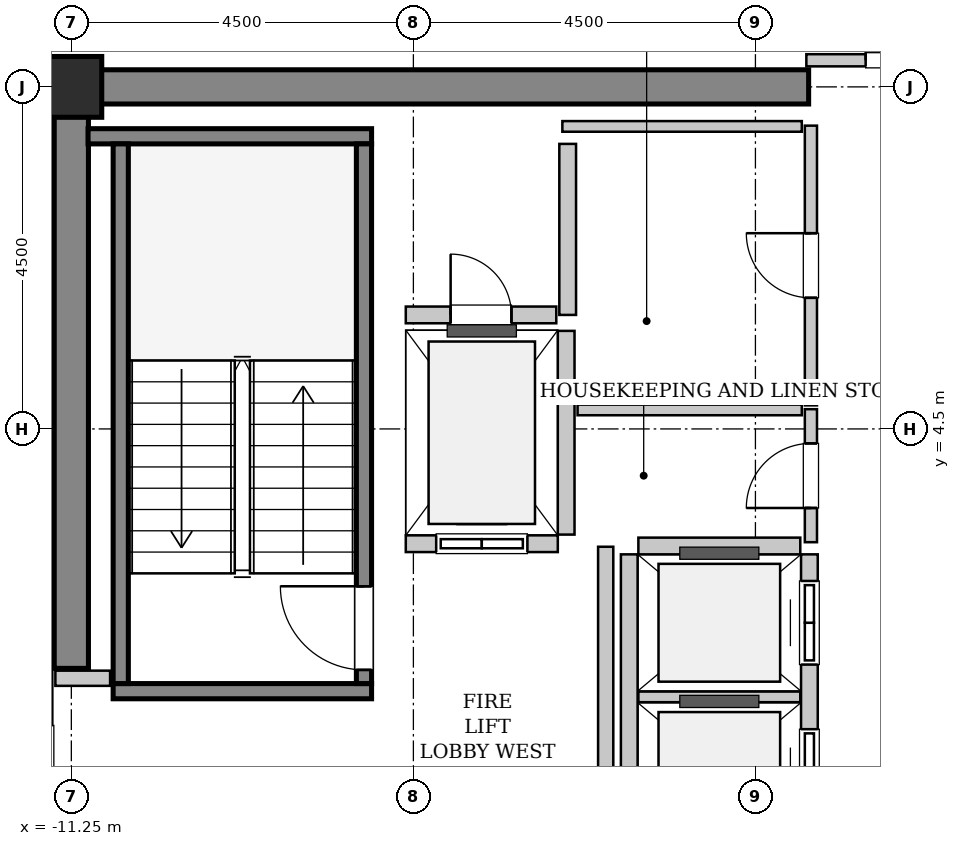
"""IFC4 building model, lengths in metres.
Left out: names, types, materials, properties, quantities, classifications, styles, units other than length and angle.
Written with IfcOpenShell. Run it as: python <this file> out.ifc"""

import sys

from ifc_helpers import new_model, si_unit, direction, frame, frame_2d, origin, origin_2d, place, context, subcontext, project, spatial, rectangle, hollow_rectangle, extrude, source, transform, mapped, element, fill, save


model = new_model("IFC4")
c1 = context("Model", 3, precision=1e-05, world=origin(), true_north=direction((0.0, 1.0)))
c2 = subcontext(c1, "Body", "Model", "MODEL_VIEW")
j1 = project(units=[si_unit("LENGTHUNIT", "METRE"), si_unit("PLANEANGLEUNIT", "RADIAN")], contexts=[c1])
p1 = place(None, origin())
s1 = spatial("IfcSite", under=j1, at=p1, CompositionType="ELEMENT")
p2 = place(p1, origin())
s2 = spatial("IfcBuilding", under=s1, at=p2, CompositionType="ELEMENT")
p3 = place(p2, frame((0.0, 0.0, 264.6)))
s3 = spatial("IfcBuildingStorey", under=s2, at=p3, CompositionType="ELEMENT", Elevation=264.6)
m1 = source(origin(), c2, "Body", "SweptSolid", [
    extrude(rectangle(XDim=9.925, YDim=0.45, at=frame_2d((4.962, 0.0))), origin(), (0.0, 0.0, 1.0), 3.8),
])
p4 = place(p3, frame((-11.475, 9.0, 0.0), z_axis=(0.0, 0.0, 1.0), x_axis=(1.0, 0.0, 0.0)))
e1 = element("IfcWall", 1, at=p4, inside=s3, PredefinedType="SHEAR", context=c2, shape_type="MappedRepresentation", body=[
    mapped(m1, transform((0.0, 0.0, 0.0), x_axis=(1.0, 0.0, 0.0), y_axis=(0.0, 1.0, 0.0), z_axis=(0.0, 0.0, 1.0), scale=1.0)),
])
m2 = source(origin(), c2, "Body", "SweptSolid", [
    extrude(rectangle(XDim=7.425, YDim=0.45, at=frame_2d((3.712, 0.0))), origin(), (0.0, 0.0, 1.0), 3.8),
])
p5 = place(p3, frame((-11.25, 1.35, 0.0), z_axis=(0.0, 0.0, 1.0), x_axis=(0.0, 1.0, 0.0)))
e2 = element("IfcWall", 2, at=p5, inside=s3, PredefinedType="SHEAR", context=c2, shape_type="MappedRepresentation", body=[
    mapped(m2, transform((0.0, 0.0, 0.0), x_axis=(1.0, 0.0, 0.0), y_axis=(0.0, 1.0, 0.0), z_axis=(0.0, 0.0, 1.0), scale=1.0)),
])
m3 = source(origin(), c2, "Body", "SweptSolid", [
    extrude(hollow_rectangle(XDim=0.8, YDim=0.8, WallThickness=0.04, InnerFilletRadius=0.04, OuterFilletRadius=0.08, at=origin_2d()), origin(), (0.0, 0.0, 1.0), 3.8),
])
p6 = place(p3, frame((-11.25, 9.0, 0.0), z_axis=(0.0, 0.0, 1.0), x_axis=(1.0, 0.0, 0.0)))
e3 = element("IfcColumn", 3, at=p6, inside=s3, PredefinedType="COLUMN", context=c2, shape_type="MappedRepresentation", body=[
    mapped(m3, transform((0.0, 0.0, 0.0), x_axis=(1.0, 0.0, 0.0), y_axis=(0.0, 1.0, 0.0), z_axis=(0.0, 0.0, 1.0), scale=1.0)),
])
m4 = source(origin(), c2, "Body", "SweptSolid", [
    extrude(rectangle(XDim=3.4, YDim=0.2, at=frame_2d((1.7, 0.0))), origin(), (0.0, 0.0, 1.0), 3.8),
])
p7 = place(p3, frame((-7.3, 1.05, 0.0), z_axis=(0.0, 0.0, 1.0), x_axis=(-1.0, 0.0, 0.0)))
e4 = element("IfcWall", 4, at=p7, inside=s3, PredefinedType="SOLIDWALL", context=c2, shape_type="MappedRepresentation", body=[
    mapped(m4, transform((0.0, 0.0, 0.0), x_axis=(1.0, 0.0, 0.0), y_axis=(0.0, 1.0, 0.0), z_axis=(0.0, 0.0, 1.0), scale=1.0)),
])
m5 = source(origin(), c2, "Body", "SweptSolid", [
    extrude(rectangle(XDim=3.73, YDim=0.2, at=frame_2d((1.865, 0.0))), origin(), (0.0, 0.0, 1.0), 3.8),
])
p8 = place(p3, frame((-7.3, 8.35, 0.0), z_axis=(0.0, 0.0, 1.0), x_axis=(-1.0, 0.0, 0.0)))
e5 = element("IfcWall", 5, at=p8, inside=s3, PredefinedType="SOLIDWALL", context=c2, shape_type="MappedRepresentation", body=[
    mapped(m5, transform((0.0, 0.0, 0.0), x_axis=(1.0, 0.0, 0.0), y_axis=(0.0, 1.0, 0.0), z_axis=(0.0, 0.0, 1.0), scale=1.0)),
])
m6 = source(origin(), c2, "Body", "SweptSolid", [
    extrude(rectangle(XDim=7.1, YDim=0.2, at=frame_2d((3.55, 0.0))), origin(), (0.0, 0.0, 1.0), 3.8),
])
p9 = place(p3, frame((-7.4, 1.15, 0.0), z_axis=(0.0, 0.0, 1.0), x_axis=(0.0, 1.0, 0.0)))
e6 = element("IfcWall", 6, at=p9, inside=s3, PredefinedType="SOLIDWALL", context=c2, shape_type="MappedRepresentation", body=[
    mapped(m6, transform((0.0, 0.0, 0.0), x_axis=(1.0, 0.0, 0.0), y_axis=(0.0, 1.0, 0.0), z_axis=(0.0, 0.0, 1.0), scale=1.0)),
])
p10 = place(p9, frame((0.18, 0.0, 0.0)))
e7 = element("IfcOpeningElement", 7, at=p10, cuts=e6, PredefinedType="OPENING", context=c2, shape_type="SweptSolid", body=[
    extrude(rectangle(XDim=1.1, YDim=2.15, at=frame_2d((0.55, 1.075))), frame((0.0, 0.11, 0.0), z_axis=(0.0, -1.0, 0.0), x_axis=(1.0, 0.0, 0.0)), (0.0, 0.0, 1.0), 0.22),
])
p11 = place(p3, frame((-10.6, 1.15, 0.0), z_axis=(0.0, 0.0, 1.0), x_axis=(0.0, 1.0, 0.0)))
e8 = element("IfcWall", 8, at=p11, inside=s3, PredefinedType="SOLIDWALL", context=c2, shape_type="MappedRepresentation", body=[
    mapped(m6, transform((0.0, 0.0, 0.0), x_axis=(1.0, 0.0, 0.0), y_axis=(0.0, 1.0, 0.0), z_axis=(0.0, 0.0, 1.0), scale=1.0)),
])
m7 = source(origin(), c2, "Body", "SweptSolid", [
    extrude(rectangle(XDim=2.0, YDim=0.22, at=frame_2d((1.0, 0.0))), origin(), (0.0, 0.0, 1.0), 3.535),
])
p12 = place(p3, frame((-6.85, 2.99, 0.0), z_axis=(0.0, 0.0, 1.0), x_axis=(1.0, 0.0, 0.0)))
e9 = element("IfcWall", 9, at=p12, inside=s3, PredefinedType="SOLIDWALL", context=c2, shape_type="MappedRepresentation", body=[
    mapped(m7, transform((0.0, 0.0, 0.0), x_axis=(1.0, 0.0, 0.0), y_axis=(0.0, 1.0, 0.0), z_axis=(0.0, 0.0, 1.0), scale=1.0)),
])
p13 = place(p12, frame((0.4, 0.0, 0.0)))
e10 = element("IfcOpeningElement", 10, at=p13, cuts=e9, PredefinedType="OPENING", context=c2, shape_type="SweptSolid", body=[
    extrude(rectangle(XDim=1.2, YDim=2.2, at=frame_2d((0.6, 1.1))), frame((0.0, 0.12, 0.0), z_axis=(0.0, -1.0, 0.0), x_axis=(1.0, 0.0, 0.0)), (0.0, 0.0, 1.0), 0.24),
])
m8 = source(origin(), c2, "Body", "SweptSolid", [
    extrude(rectangle(XDim=2.68, YDim=0.22, at=frame_2d((1.34, 0.0))), origin(), (0.0, 0.0, 1.0), 3.535),
])
p14 = place(p3, frame((-4.74, 3.11, 0.0), z_axis=(0.0, 0.0, 1.0), x_axis=(0.0, 1.0, 0.0)))
e11 = element("IfcWall", 11, at=p14, inside=s3, PredefinedType="SOLIDWALL", context=c2, shape_type="MappedRepresentation", body=[
    mapped(m8, transform((0.0, 0.0, 0.0), x_axis=(1.0, 0.0, 0.0), y_axis=(0.0, 1.0, 0.0), z_axis=(0.0, 0.0, 1.0), scale=1.0)),
])
m9 = source(origin(), c2, "Body", "SweptSolid", [
    extrude(rectangle(XDim=5.7, YDim=0.22, at=frame_2d((2.85, 0.0))), origin(), (0.0, 0.0, 1.0), 3.535),
])
p15 = place(p3, frame((-1.54, -2.85, 0.0), z_axis=(0.0, 0.0, 1.0), x_axis=(0.0, 1.0, 0.0)))
e12 = element("IfcWall", 12, at=p15, inside=s3, PredefinedType="SOLIDWALL", context=c2, shape_type="MappedRepresentation", body=[
    mapped(m9, transform((0.0, 0.0, 0.0), x_axis=(1.0, 0.0, 0.0), y_axis=(0.0, 1.0, 0.0), z_axis=(0.0, 0.0, 1.0), scale=1.0)),
])
p16 = place(p15, frame((0.35, 0.0, 0.0)))
e13 = element("IfcOpeningElement", 13, at=p16, cuts=e12, PredefinedType="OPENING", context=c2, shape_type="SweptSolid", body=[
    extrude(rectangle(XDim=1.1, YDim=2.2, at=frame_2d((0.55, 1.1))), frame((0.0, 0.12, 0.0), z_axis=(0.0, -1.0, 0.0), x_axis=(1.0, 0.0, 0.0)), (0.0, 0.0, 1.0), 0.24),
])
p17 = place(p15, frame((2.3, 0.0, 0.0)))
e14 = element("IfcOpeningElement", 14, at=p17, cuts=e12, PredefinedType="OPENING", context=c2, shape_type="SweptSolid", body=[
    extrude(rectangle(XDim=1.1, YDim=2.2, at=frame_2d((0.55, 1.1))), frame((0.0, 0.12, 0.0), z_axis=(0.0, -1.0, 0.0), x_axis=(1.0, 0.0, 0.0)), (0.0, 0.0, 1.0), 0.24),
])
p18 = place(p15, frame((4.25, 0.0, 0.0)))
e15 = element("IfcOpeningElement", 15, at=p18, cuts=e12, PredefinedType="OPENING", context=c2, shape_type="SweptSolid", body=[
    extrude(rectangle(XDim=1.1, YDim=2.2, at=frame_2d((0.55, 1.1))), frame((0.0, 0.12, 0.0), z_axis=(0.0, -1.0, 0.0), x_axis=(1.0, 0.0, 0.0)), (0.0, 0.0, 1.0), 0.24),
])
p19 = place(p3, frame((-3.91, 2.85, 0.0), z_axis=(0.0, 0.0, 1.0), x_axis=(0.0, -1.0, 0.0)))
e16 = element("IfcWall", 16, at=p19, inside=s3, PredefinedType="SOLIDWALL", context=c2, shape_type="MappedRepresentation", body=[
    mapped(m9, transform((0.0, 0.0, 0.0), x_axis=(1.0, 0.0, 0.0), y_axis=(0.0, 1.0, 0.0), z_axis=(0.0, 0.0, 1.0), scale=1.0)),
])
m10 = source(origin(), c2, "Body", "SweptSolid", [
    extrude(rectangle(XDim=2.13, YDim=0.14, at=frame_2d((1.065, 0.0))), origin(), (0.0, 0.0, 1.0), 3.535),
])
p20 = place(p3, frame((-3.79, 0.975, 0.0), z_axis=(0.0, 0.0, 1.0), x_axis=(1.0, 0.0, 0.0)))
e17 = element("IfcWall", 17, at=p20, inside=s3, PredefinedType="PARTITIONING", context=c2, shape_type="MappedRepresentation", body=[
    mapped(m10, transform((0.0, 0.0, 0.0), x_axis=(1.0, 0.0, 0.0), y_axis=(0.0, 1.0, 0.0), z_axis=(0.0, 0.0, 1.0), scale=1.0)),
])
m11 = source(origin(), c2, "Body", "SweptSolid", [
    extrude(rectangle(XDim=2.13, YDim=0.22, at=frame_2d((1.065, 0.0))), origin(), (0.0, 0.0, 1.0), 3.535),
])
p21 = place(p3, frame((-1.66, 2.96, 0.0), z_axis=(0.0, 0.0, 1.0), x_axis=(-1.0, 0.0, 0.0)))
e18 = element("IfcWall", 18, at=p21, inside=s3, PredefinedType="SOLIDWALL", context=c2, shape_type="MappedRepresentation", body=[
    mapped(m11, transform((0.0, 0.0, 0.0), x_axis=(1.0, 0.0, 0.0), y_axis=(0.0, 1.0, 0.0), z_axis=(0.0, 0.0, 1.0), scale=1.0)),
])
m12 = source(origin(), c2, "Body", "SweptSolid", [
    extrude(rectangle(XDim=2.25, YDim=0.22, at=frame_2d((1.125, 0.0))), origin(), (0.0, 0.0, 1.0), 3.535),
])
p22 = place(p3, frame((-4.72, 6.0, 0.0), z_axis=(0.0, 0.0, 1.0), x_axis=(0.0, 1.0, 0.0)))
e19 = element("IfcWall", 19, at=p22, inside=s3, PredefinedType="SOLIDWALL", context=c2, shape_type="MappedRepresentation", body=[
    mapped(m12, transform((0.0, 0.0, 0.0), x_axis=(1.0, 0.0, 0.0), y_axis=(0.0, 1.0, 0.0), z_axis=(0.0, 0.0, 1.0), scale=1.0)),
])
m13 = source(origin(), c2, "Body", "SweptSolid", [
    extrude(rectangle(XDim=1.98, YDim=0.22, at=frame_2d((0.99, 0.0))), origin(), (0.0, 0.0, 1.0), 3.535),
])
p23 = place(p3, frame((-6.85, 6.0, 0.0), z_axis=(0.0, 0.0, 1.0), x_axis=(1.0, 0.0, 0.0)))
e20 = element("IfcWall", 20, at=p23, inside=s3, PredefinedType="SOLIDWALL", context=c2, shape_type="MappedRepresentation", body=[
    mapped(m13, transform((0.0, 0.0, 0.0), x_axis=(1.0, 0.0, 0.0), y_axis=(0.0, 1.0, 0.0), z_axis=(0.0, 0.0, 1.0), scale=1.0)),
])
p24 = place(p23, frame((0.59, 0.0, 0.0)))
e21 = element("IfcOpeningElement", 21, at=p24, cuts=e20, PredefinedType="OPENING", context=c2, shape_type="SweptSolid", body=[
    extrude(rectangle(XDim=0.8, YDim=2.0, at=frame_2d((0.4, 1.0))), frame((0.0, 0.12, 0.0), z_axis=(0.0, -1.0, 0.0), x_axis=(1.0, 0.0, 0.0)), (0.0, 0.0, 1.0), 0.24),
])
m14 = source(origin(), c2, "Body", "SweptSolid", [
    extrude(rectangle(XDim=5.9, YDim=0.2, at=frame_2d((2.95, 0.0))), origin(), (0.0, 0.0, 1.0), 3.535),
])
p25 = place(p3, frame((-4.22, -2.95, 0.0), z_axis=(0.0, 0.0, 1.0), x_axis=(0.0, 1.0, 0.0)))
e22 = element("IfcWall", 22, at=p25, inside=s3, PredefinedType="PARTITIONING", context=c2, shape_type="MappedRepresentation", body=[
    mapped(m14, transform((0.0, 0.0, 0.0), x_axis=(1.0, 0.0, 0.0), y_axis=(0.0, 1.0, 0.0), z_axis=(0.0, 0.0, 1.0), scale=1.0)),
])
m15 = source(origin(), c2, "Body", "SweptSolid", [
    extrude(rectangle(XDim=0.72, YDim=0.2, at=frame_2d((0.36, 0.0))), origin(), (0.0, 0.0, 1.0), 3.535),
])
p26 = place(p3, frame((-11.46, 1.22, 0.0), z_axis=(0.0, 0.0, 1.0), x_axis=(1.0, 0.0, 0.0)))
e23 = element("IfcWall", 23, at=p26, inside=s3, PredefinedType="PARTITIONING", context=c2, shape_type="MappedRepresentation", body=[
    mapped(m15, transform((0.0, 0.0, 0.0), x_axis=(1.0, 0.0, 0.0), y_axis=(0.0, 1.0, 0.0), z_axis=(0.0, 0.0, 1.0), scale=1.0)),
])
m16 = source(origin(), c2, "Body", "SweptSolid", [
    extrude(rectangle(XDim=3.16, YDim=0.16, at=frame_2d((1.58, 0.0))), origin(), (0.0, 0.0, 1.0), 2.625),
])
p27 = place(p3, frame((-1.58, 9.35, 0.0), z_axis=(0.0, 0.0, 1.0), x_axis=(1.0, 0.0, 0.0)))
e24 = element("IfcWall", 24, at=p27, inside=s3, PredefinedType="PARTITIONING", context=c2, shape_type="MappedRepresentation", body=[
    mapped(m16, transform((0.0, 0.0, 0.0), x_axis=(1.0, 0.0, 0.0), y_axis=(0.0, 1.0, 0.0), z_axis=(0.0, 0.0, 1.0), scale=1.0)),
])
p28 = place(p27, frame((0.78, 0.0, 0.0)))
e25 = element("IfcOpeningElement", 25, at=p28, cuts=e24, PredefinedType="OPENING", context=c2, shape_type="SweptSolid", body=[
    extrude(rectangle(XDim=1.6, YDim=2.3, at=frame_2d((0.8, 1.15))), frame((0.0, 0.09, 0.0), z_axis=(0.0, -1.0, 0.0), x_axis=(1.0, 0.0, 0.0)), (0.0, 0.0, 1.0), 0.18),
])
m17 = source(origin(), c2, "Body", "SweptSolid", [
    extrude(rectangle(XDim=1.75, YDim=0.16, at=frame_2d((0.875, 0.0))), origin(), (0.0, 0.0, 1.0), 3.535),
])
p29 = place(p3, frame((-1.52, 3.01, 0.0), z_axis=(0.0, 0.0, 1.0), x_axis=(0.0, 1.0, 0.0)))
e26 = element("IfcWall", 26, at=p29, inside=s3, PredefinedType="PARTITIONING", context=c2, shape_type="MappedRepresentation", body=[
    mapped(m17, transform((0.0, 0.0, 0.0), x_axis=(1.0, 0.0, 0.0), y_axis=(0.0, 1.0, 0.0), z_axis=(0.0, 0.0, 1.0), scale=1.0)),
])
p30 = place(p29, frame((0.45, 0.0, 0.0)))
e27 = element("IfcOpeningElement", 27, at=p30, cuts=e26, PredefinedType="OPENING", context=c2, shape_type="SweptSolid", body=[
    extrude(rectangle(XDim=0.85, YDim=2.1, at=frame_2d((0.425, 1.05))), frame((0.0, 0.09, 0.0), z_axis=(0.0, -1.0, 0.0), x_axis=(1.0, 0.0, 0.0)), (0.0, 0.0, 1.0), 0.18),
])
m18 = source(origin(), c2, "Body", "SweptSolid", [
    extrude(rectangle(XDim=2.95, YDim=0.14, at=frame_2d((1.475, 0.0))), origin(), (0.0, 0.0, 1.0), 3.535),
])
p31 = place(p3, frame((-4.59, 4.75, 0.0), z_axis=(0.0, 0.0, 1.0), x_axis=(1.0, 0.0, 0.0)))
e28 = element("IfcWall", 28, at=p31, inside=s3, PredefinedType="PARTITIONING", context=c2, shape_type="MappedRepresentation", body=[
    mapped(m18, transform((0.0, 0.0, 0.0), x_axis=(1.0, 0.0, 0.0), y_axis=(0.0, 1.0, 0.0), z_axis=(0.0, 0.0, 1.0), scale=1.0)),
])
m19 = source(origin(), c2, "Body", "SweptSolid", [
    extrude(rectangle(XDim=3.68, YDim=0.16, at=frame_2d((1.84, 0.0))), origin(), (0.0, 0.0, 1.0), 3.535),
])
p32 = place(p3, frame((-1.52, 4.81, 0.0), z_axis=(0.0, 0.0, 1.0), x_axis=(0.0, 1.0, 0.0)))
e29 = element("IfcWall", 29, at=p32, inside=s3, PredefinedType="PARTITIONING", context=c2, shape_type="MappedRepresentation", body=[
    mapped(m19, transform((0.0, 0.0, 0.0), x_axis=(1.0, 0.0, 0.0), y_axis=(0.0, 1.0, 0.0), z_axis=(0.0, 0.0, 1.0), scale=1.0)),
])
p33 = place(p32, frame((1.415, 0.0, 0.0)))
e30 = element("IfcOpeningElement", 30, at=p33, cuts=e29, PredefinedType="OPENING", context=c2, shape_type="SweptSolid", body=[
    extrude(rectangle(XDim=0.85, YDim=2.1, at=frame_2d((0.425, 1.05))), frame((0.0, 0.09, 0.0), z_axis=(0.0, -1.0, 0.0), x_axis=(1.0, 0.0, 0.0)), (0.0, 0.0, 1.0), 0.18),
])
m20 = source(origin(), c2, "Body", "SweptSolid", [
    extrude(rectangle(XDim=3.15, YDim=0.14, at=frame_2d((1.575, 0.0))), origin(), (0.0, 0.0, 1.0), 3.535),
])
p34 = place(p3, frame((-4.79, 8.48, 0.0), z_axis=(0.0, 0.0, 1.0), x_axis=(1.0, 0.0, 0.0)))
e31 = element("IfcWall", 31, at=p34, inside=s3, PredefinedType="PARTITIONING", context=c2, shape_type="MappedRepresentation", body=[
    mapped(m20, transform((0.0, 0.0, 0.0), x_axis=(1.0, 0.0, 0.0), y_axis=(0.0, 1.0, 0.0), z_axis=(0.0, 0.0, 1.0), scale=1.0)),
])
m21 = source(origin(), c2, "Body", "SweptSolid", [
    extrude(rectangle(XDim=1.1, YDim=2.15, at=frame_2d((0.55, 1.075))), frame((0.0, 0.025, 0.0), z_axis=(0.0, -1.0, 0.0), x_axis=(1.0, 0.0, 0.0)), (0.0, 0.0, 1.0), 0.05),
])
p35 = place(p10, origin())
e32 = element("IfcDoor", 32, at=p35, inside=s3, OperationType="SINGLE_SWING_RIGHT", PredefinedType="DOOR", context=c2, shape_type="MappedRepresentation", body=[
    mapped(m21, transform((0.0, 0.0, 0.0), x_axis=(1.0, 0.0, 0.0), y_axis=(0.0, 1.0, 0.0), z_axis=(0.0, 0.0, 1.0), scale=1.0)),
])
fill(e7, e32)
m22 = source(origin(), c2, "Body", "SweptSolid", [
    extrude(rectangle(XDim=1.2, YDim=2.2, at=frame_2d((0.6, 1.1))), frame((0.0, 0.025, 0.0), z_axis=(0.0, -1.0, 0.0), x_axis=(1.0, 0.0, 0.0)), (0.0, 0.0, 1.0), 0.05),
])
p36 = place(p13, origin())
e33 = element("IfcDoor", 33, at=p36, inside=s3, OperationType="SLIDING_TO_LEFT", PredefinedType="DOOR", context=c2, shape_type="MappedRepresentation", body=[
    mapped(m22, transform((0.0, 0.0, 0.0), x_axis=(1.0, 0.0, 0.0), y_axis=(0.0, 1.0, 0.0), z_axis=(0.0, 0.0, 1.0), scale=1.0)),
])
fill(e10, e33)
m23 = source(origin(), c2, "Body", "SweptSolid", [
    extrude(rectangle(XDim=1.1, YDim=2.2, at=frame_2d((0.55, 1.1))), frame((0.0, 0.025, 0.0), z_axis=(0.0, -1.0, 0.0), x_axis=(1.0, 0.0, 0.0)), (0.0, 0.0, 1.0), 0.05),
])
p37 = place(p17, origin())
e34 = element("IfcDoor", 34, at=p37, inside=s3, OperationType="DOUBLE_DOOR_SLIDING", PredefinedType="DOOR", context=c2, shape_type="MappedRepresentation", body=[
    mapped(m23, transform((0.0, 0.0, 0.0), x_axis=(1.0, 0.0, 0.0), y_axis=(0.0, 1.0, 0.0), z_axis=(0.0, 0.0, 1.0), scale=1.0)),
])
fill(e14, e34)
p38 = place(p18, origin())
e35 = element("IfcDoor", 35, at=p38, inside=s3, OperationType="DOUBLE_DOOR_SLIDING", PredefinedType="DOOR", context=c2, shape_type="MappedRepresentation", body=[
    mapped(m23, transform((0.0, 0.0, 0.0), x_axis=(1.0, 0.0, 0.0), y_axis=(0.0, 1.0, 0.0), z_axis=(0.0, 0.0, 1.0), scale=1.0)),
])
fill(e15, e35)
m24 = source(origin(), c2, "Body", "SweptSolid", [
    extrude(rectangle(XDim=0.8, YDim=2.0, at=frame_2d((0.4, 1.0))), frame((0.0, 0.025, 0.0), z_axis=(0.0, -1.0, 0.0), x_axis=(1.0, 0.0, 0.0)), (0.0, 0.0, 1.0), 0.05),
])
p39 = place(p24, origin())
e36 = element("IfcDoor", 36, at=p39, inside=s3, OperationType="SINGLE_SWING_LEFT", PredefinedType="TRAPDOOR", context=c2, shape_type="MappedRepresentation", body=[
    mapped(m24, transform((0.0, 0.0, 0.0), x_axis=(1.0, 0.0, 0.0), y_axis=(0.0, 1.0, 0.0), z_axis=(0.0, 0.0, 1.0), scale=1.0)),
])
fill(e21, e36)
m25 = source(origin(), c2, "Body", "SweptSolid", [
    extrude(rectangle(XDim=1.6, YDim=2.3, at=frame_2d((0.8, 1.15))), frame((0.0, 0.025, 0.0), z_axis=(0.0, -1.0, 0.0), x_axis=(1.0, 0.0, 0.0)), (0.0, 0.0, 1.0), 0.05),
])
p40 = place(p28, origin())
e37 = element("IfcDoor", 37, at=p40, inside=s3, OperationType="DOUBLE_DOOR_SINGLE_SWING", PredefinedType="DOOR", context=c2, shape_type="MappedRepresentation", body=[
    mapped(m25, transform((0.0, 0.0, 0.0), x_axis=(1.0, 0.0, 0.0), y_axis=(0.0, 1.0, 0.0), z_axis=(0.0, 0.0, 1.0), scale=1.0)),
])
fill(e25, e37)
m26 = source(origin(), c2, "Body", "SweptSolid", [
    extrude(rectangle(XDim=0.85, YDim=2.1, at=frame_2d((0.425, 1.05))), frame((0.0, 0.025, 0.0), z_axis=(0.0, -1.0, 0.0), x_axis=(1.0, 0.0, 0.0)), (0.0, 0.0, 1.0), 0.05),
])
p41 = place(p30, origin())
e38 = element("IfcDoor", 38, at=p41, inside=s3, OperationType="SINGLE_SWING_LEFT", PredefinedType="DOOR", context=c2, shape_type="MappedRepresentation", body=[
    mapped(m26, transform((0.0, 0.0, 0.0), x_axis=(1.0, 0.0, 0.0), y_axis=(0.0, 1.0, 0.0), z_axis=(0.0, 0.0, 1.0), scale=1.0)),
])
fill(e27, e38)
p42 = place(p33, origin())
e39 = element("IfcDoor", 39, at=p42, inside=s3, OperationType="SINGLE_SWING_RIGHT", PredefinedType="DOOR", context=c2, shape_type="MappedRepresentation", body=[
    mapped(m26, transform((0.0, 0.0, 0.0), x_axis=(1.0, 0.0, 0.0), y_axis=(0.0, 1.0, 0.0), z_axis=(0.0, 0.0, 1.0), scale=1.0)),
])
fill(e30, e39)
save(model, sys.argv[1])
